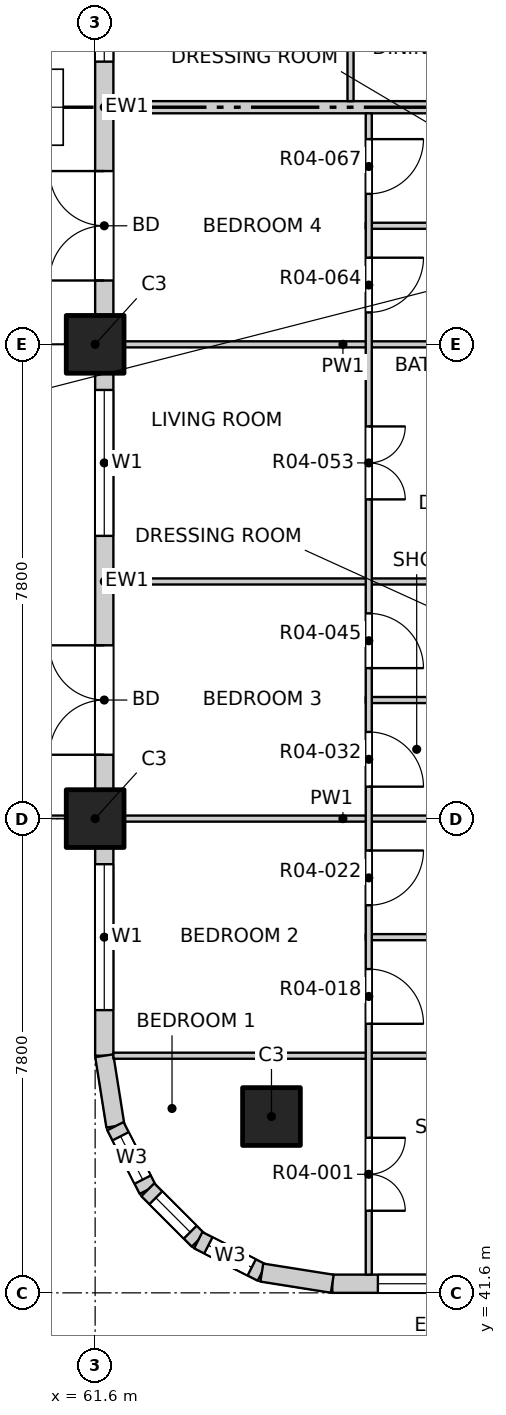
"""IFC4 building model, lengths in metres.
Left out: names, types, materials, properties, quantities, classifications, styles, units other than length and angle.
Written with IfcOpenShell. Run it as: python <this file> out.ifc"""

import sys

from ifc_helpers import new_model, si_unit, direction, frame, frame_2d, origin, origin_2d, place, context, subcontext, project, spatial, rectangle, extrude, element, fill, save


model = new_model("IFC4")
c1 = context("Model", 3, precision=1e-05, world=origin(), true_north=direction((0.0, 1.0)))
c2 = subcontext(c1, "Body", "Model", "MODEL_VIEW")
j1 = project(units=[si_unit("LENGTHUNIT", "METRE"), si_unit("PLANEANGLEUNIT", "RADIAN")], contexts=[c1])
p1 = place(None, origin())
s1 = spatial("IfcSite", under=j1, at=p1, CompositionType="ELEMENT")
p2 = place(p1, origin())
s2 = spatial("IfcBuilding", under=s1, at=p2, CompositionType="ELEMENT")
p3 = place(p2, frame((0.0, 0.0, 58.0)))
s3 = spatial("IfcBuildingStorey", under=s2, at=p3, CompositionType="ELEMENT", Elevation=58.0)
for number, where, z_axis, x_axis in (
    (1, (64.5, 44.5, -0.25), (0.0, 0.0, 1.0), (1.0, 0.0, 0.0)),
    (2, (61.6, 49.4, -0.25), (0.0, 0.0, 1.0), (1.0, 0.0, 0.0)),
    (3, (61.6, 57.2, -0.25), (0.0, 0.0, 1.0), (1.0, 0.0, 0.0)),
):
    element("IfcColumn", number, at=place(p3, frame(where, z_axis=z_axis, x_axis=x_axis)), inside=s3, PredefinedType="COLUMN", context=c2, shape_type="SweptSolid", body=[
        extrude(rectangle(XDim=0.95, YDim=0.95, at=origin_2d()), origin(), (0.0, 0.0, 1.0), 3.4),
    ])
p4 = place(p3, frame((65.5, 41.75, 0.0), z_axis=(0.0, 0.0, 1.0), x_axis=(1.0, 0.0, 0.0)))
e4 = element("IfcWall", 4, at=p4, inside=s3, PredefinedType="SOLIDWALL", context=c2, shape_type="SweptSolid", body=[
    extrude(rectangle(XDim=3.425, YDim=0.3, at=frame_2d((1.712, 0.0))), origin(), (0.0, 0.0, 1.0), 2.7),
])
p5 = place(p4, frame((0.75, 0.0, 0.9)))
e5 = element("IfcOpeningElement", 5, at=p5, cuts=e4, PredefinedType="OPENING", context=c2, shape_type="SweptSolid", body=[
    extrude(rectangle(XDim=2.4, YDim=1.8, at=frame_2d((1.2, 0.9))), frame((0.0, 0.16, 0.0), z_axis=(0.0, -1.0, 0.0), x_axis=(1.0, 0.0, 0.0)), (0.0, 0.0, 1.0), 0.32),
])
p6 = place(p3, frame((61.75, 45.5, 0.0), z_axis=(0.0, 0.0, 1.0), x_axis=(0.0, 1.0, 0.0)))
e6 = element("IfcWall", 6, at=p6, inside=s3, PredefinedType="SOLIDWALL", context=c2, shape_type="SweptSolid", body=[
    extrude(rectangle(XDim=3.425, YDim=0.3, at=frame_2d((1.712, 0.0))), origin(), (0.0, 0.0, 1.0), 2.7),
])
p7 = place(p6, frame((0.75, 0.0, 0.9)))
e7 = element("IfcOpeningElement", 7, at=p7, cuts=e6, PredefinedType="OPENING", context=c2, shape_type="SweptSolid", body=[
    extrude(rectangle(XDim=2.4, YDim=1.8, at=frame_2d((1.2, 0.9))), frame((0.0, 0.16, 0.0), z_axis=(0.0, -1.0, 0.0), x_axis=(1.0, 0.0, 0.0)), (0.0, 0.0, 1.0), 0.32),
])
p8 = place(p3, frame((61.75, 49.875, 0.0), z_axis=(0.0, 0.0, 1.0), x_axis=(0.0, 1.0, 0.0)))
e8 = element("IfcWall", 8, at=p8, inside=s3, PredefinedType="SOLIDWALL", context=c2, shape_type="SweptSolid", body=[
    extrude(rectangle(XDim=6.85, YDim=0.3, at=frame_2d((3.425, 0.0))), origin(), (0.0, 0.0, 1.0), 2.7),
])
p9 = place(p8, frame((0.575, 0.0, 0.0)))
e9 = element("IfcOpeningElement", 9, at=p9, cuts=e8, PredefinedType="OPENING", context=c2, shape_type="SweptSolid", body=[
    extrude(rectangle(XDim=1.8, YDim=2.4, at=frame_2d((0.9, 1.2))), frame((0.0, 0.16, 0.0), z_axis=(0.0, -1.0, 0.0), x_axis=(1.0, 0.0, 0.0)), (0.0, 0.0, 1.0), 0.32),
])
p10 = place(p8, frame((4.175, 0.0, 0.9)))
e10 = element("IfcOpeningElement", 10, at=p10, cuts=e8, PredefinedType="OPENING", context=c2, shape_type="SweptSolid", body=[
    extrude(rectangle(XDim=2.4, YDim=1.8, at=frame_2d((1.2, 0.9))), frame((0.0, 0.16, 0.0), z_axis=(0.0, -1.0, 0.0), x_axis=(1.0, 0.0, 0.0)), (0.0, 0.0, 1.0), 0.32),
])
p11 = place(p3, frame((61.75, 57.675, 0.0), z_axis=(0.0, 0.0, 1.0), x_axis=(0.0, 1.0, 0.0)))
e11 = element("IfcWall", 11, at=p11, inside=s3, PredefinedType="SOLIDWALL", context=c2, shape_type="SweptSolid", body=[
    extrude(rectangle(XDim=6.85, YDim=0.3, at=frame_2d((3.425, 0.0))), origin(), (0.0, 0.0, 1.0), 2.7),
])
p12 = place(p11, frame((0.575, 0.0, 0.0)))
e12 = element("IfcOpeningElement", 12, at=p12, cuts=e11, PredefinedType="OPENING", context=c2, shape_type="SweptSolid", body=[
    extrude(rectangle(XDim=1.8, YDim=2.4, at=frame_2d((0.9, 1.2))), frame((0.0, 0.16, 0.0), z_axis=(0.0, -1.0, 0.0), x_axis=(1.0, 0.0, 0.0)), (0.0, 0.0, 1.0), 0.32),
])
p13 = place(p11, frame((4.175, 0.0, 0.9)))
e13 = element("IfcOpeningElement", 13, at=p13, cuts=e11, PredefinedType="OPENING", context=c2, shape_type="SweptSolid", body=[
    extrude(rectangle(XDim=2.4, YDim=1.8, at=frame_2d((1.2, 0.9))), frame((0.0, 0.16, 0.0), z_axis=(0.0, -1.0, 0.0), x_axis=(1.0, 0.0, 0.0)), (0.0, 0.0, 1.0), 0.32),
])
p14 = place(p3, frame((61.75, 45.5, 0.0), z_axis=(0.0, 0.0, 1.0), x_axis=(0.156496880861, -0.987678452879, 0.0)))
e14 = element("IfcWall", 14, at=p14, inside=s3, PredefinedType="SOLIDWALL", context=c2, shape_type="SweptSolid", body=[
    extrude(rectangle(XDim=1.173, YDim=0.3, at=frame_2d((0.586, 0.0))), origin(), (0.0, 0.0, 1.0), 2.7),
])
p15 = place(p3, frame((61.934, 44.341, 0.0), z_axis=(0.0, 0.0, 1.0), x_axis=(0.454025524128, -0.890988677504, 0.0)))
e15 = element("IfcWall", 15, at=p15, inside=s3, PredefinedType="SOLIDWALL", context=c2, shape_type="SweptSolid", body=[
    extrude(rectangle(XDim=1.173, YDim=0.3, at=frame_2d((0.587, 0.0))), origin(), (0.0, 0.0, 1.0), 2.7),
])
p16 = place(p15, frame((0.187, 0.0, 0.9)))
e16 = element("IfcOpeningElement", 16, at=p16, cuts=e15, PredefinedType="OPENING", context=c2, shape_type="SweptSolid", body=[
    extrude(rectangle(XDim=0.8, YDim=1.2, at=frame_2d((0.4, 0.6))), frame((0.0, 0.16, 0.0), z_axis=(0.0, -1.0, 0.0), x_axis=(1.0, 0.0, 0.0)), (0.0, 0.0, 1.0), 0.32),
])
p17 = place(p3, frame((62.466, 43.296, 0.0), z_axis=(0.0, 0.0, 1.0), x_axis=(0.707106781187, -0.707106781187, 0.0)))
e17 = element("IfcWall", 17, at=p17, inside=s3, PredefinedType="SOLIDWALL", context=c2, shape_type="SweptSolid", body=[
    extrude(rectangle(XDim=1.173, YDim=0.3, at=frame_2d((0.586, 0.0))), origin(), (0.0, 0.0, 1.0), 2.7),
])
p18 = place(p17, frame((0.187, 0.0, 0.9)))
e18 = element("IfcOpeningElement", 18, at=p18, cuts=e17, PredefinedType="OPENING", context=c2, shape_type="SweptSolid", body=[
    extrude(rectangle(XDim=0.8, YDim=1.2, at=frame_2d((0.4, 0.6))), frame((0.0, 0.16, 0.0), z_axis=(0.0, -1.0, 0.0), x_axis=(1.0, 0.0, 0.0)), (0.0, 0.0, 1.0), 0.32),
])
p19 = place(p3, frame((63.296, 42.466, 0.0), z_axis=(0.0, 0.0, 1.0), x_axis=(0.890988677504, -0.454025524128, 0.0)))
e19 = element("IfcWall", 19, at=p19, inside=s3, PredefinedType="SOLIDWALL", context=c2, shape_type="SweptSolid", body=[
    extrude(rectangle(XDim=1.173, YDim=0.3, at=frame_2d((0.587, 0.0))), origin(), (0.0, 0.0, 1.0), 2.7),
])
p20 = place(p19, frame((0.187, 0.0, 0.9)))
e20 = element("IfcOpeningElement", 20, at=p20, cuts=e19, PredefinedType="OPENING", context=c2, shape_type="SweptSolid", body=[
    extrude(rectangle(XDim=0.8, YDim=1.2, at=frame_2d((0.4, 0.6))), frame((0.0, 0.16, 0.0), z_axis=(0.0, -1.0, 0.0), x_axis=(1.0, 0.0, 0.0)), (0.0, 0.0, 1.0), 0.32),
])
p21 = place(p3, frame((64.341, 41.934, 0.0), z_axis=(0.0, 0.0, 1.0), x_axis=(0.987678452879, -0.156496880861, 0.0)))
e21 = element("IfcWall", 21, at=p21, inside=s3, PredefinedType="SOLIDWALL", context=c2, shape_type="SweptSolid", body=[
    extrude(rectangle(XDim=1.173, YDim=0.3, at=frame_2d((0.586, 0.0))), origin(), (0.0, 0.0, 1.0), 2.7),
])
p22 = place(p3, frame((61.9, 45.5, 0.0), z_axis=(0.0, 0.0, 1.0), x_axis=(1.0, 0.0, 0.0)))
e22 = element("IfcWall", 22, at=p22, inside=s3, PredefinedType="PARTITIONING", context=c2, shape_type="SweptSolid", body=[
    extrude(rectangle(XDim=11.5, YDim=0.1, at=frame_2d((5.75, 0.0))), origin(), (0.0, 0.0, 1.0), 3.15),
])
p23 = place(p22, frame((7.965, 0.0, 0.0)))
e23 = element("IfcOpeningElement", 23, at=p23, cuts=e22, PredefinedType="OPENING", context=c2, shape_type="SweptSolid", body=[
    extrude(rectangle(XDim=0.9, YDim=2.1, at=frame_2d((0.45, 1.05))), frame((0.0, 0.06, 0.0), z_axis=(0.0, -1.0, 0.0), x_axis=(1.0, 0.0, 0.0)), (0.0, 0.0, 1.0), 0.12),
])
p24 = place(p3, frame((66.05, 47.45, 0.0), z_axis=(0.0, 0.0, 1.0), x_axis=(1.0, 0.0, 0.0)))
e24 = element("IfcWall", 24, at=p24, inside=s3, PredefinedType="PARTITIONING", context=c2, shape_type="SweptSolid", body=[
    extrude(rectangle(XDim=3.4, YDim=0.1, at=frame_2d((1.7, 0.0))), origin(), (0.0, 0.0, 1.0), 3.15),
])
p25 = place(p3, frame((61.9, 49.4, 0.0), z_axis=(0.0, 0.0, 1.0), x_axis=(1.0, 0.0, 0.0)))
e25 = element("IfcWall", 25, at=p25, inside=s3, PredefinedType="PARTITIONING", context=c2, shape_type="SweptSolid", body=[
    extrude(rectangle(XDim=7.55, YDim=0.1, at=frame_2d((3.775, 0.0))), origin(), (0.0, 0.0, 1.0), 2.55),
])
p26 = place(p3, frame((66.05, 51.35, 0.0), z_axis=(0.0, 0.0, 1.0), x_axis=(1.0, 0.0, 0.0)))
e26 = element("IfcWall", 26, at=p26, inside=s3, PredefinedType="PARTITIONING", context=c2, shape_type="SweptSolid", body=[
    extrude(rectangle(XDim=3.4, YDim=0.1, at=frame_2d((1.7, 0.0))), origin(), (0.0, 0.0, 1.0), 3.15),
])
p27 = place(p3, frame((61.9, 53.3, 0.0), z_axis=(0.0, 0.0, 1.0), x_axis=(1.0, 0.0, 0.0)))
e27 = element("IfcWall", 27, at=p27, inside=s3, PredefinedType="PARTITIONING", context=c2, shape_type="SweptSolid", body=[
    extrude(rectangle(XDim=7.55, YDim=0.1, at=frame_2d((3.775, 0.0))), origin(), (0.0, 0.0, 1.0), 3.15),
])
p28 = place(p3, frame((61.9, 57.2, 0.0), z_axis=(0.0, 0.0, 1.0), x_axis=(1.0, 0.0, 0.0)))
e28 = element("IfcWall", 28, at=p28, inside=s3, PredefinedType="PARTITIONING", context=c2, shape_type="SweptSolid", body=[
    extrude(rectangle(XDim=7.55, YDim=0.1, at=frame_2d((3.775, 0.0))), origin(), (0.0, 0.0, 1.0), 2.55),
])
p29 = place(p3, frame((66.05, 59.15, 0.0), z_axis=(0.0, 0.0, 1.0), x_axis=(1.0, 0.0, 0.0)))
e29 = element("IfcWall", 29, at=p29, inside=s3, PredefinedType="PARTITIONING", context=c2, shape_type="SweptSolid", body=[
    extrude(rectangle(XDim=3.4, YDim=0.1, at=frame_2d((1.7, 0.0))), origin(), (0.0, 0.0, 1.0), 3.15),
])
p30 = place(p3, frame((61.9, 61.1, 0.0), z_axis=(0.0, 0.0, 1.0), x_axis=(1.0, 0.0, 0.0)))
e30 = element("IfcWall", 30, at=p30, inside=s3, PredefinedType="PARTITIONING", context=c2, shape_type="SweptSolid", body=[
    extrude(rectangle(XDim=11.5, YDim=0.2, at=frame_2d((5.75, 0.0))), origin(), (0.0, 0.0, 1.0), 3.15),
])
p31 = place(p3, frame((65.8, 61.2, 0.0), z_axis=(0.0, 0.0, 1.0), x_axis=(0.0, 1.0, 0.0)))
e31 = element("IfcWall", 31, at=p31, inside=s3, PredefinedType="PARTITIONING", context=c2, shape_type="SweptSolid", body=[
    extrude(rectangle(XDim=15.4, YDim=0.1, at=frame_2d((7.7, 0.0))), origin(), (0.0, 0.0, 1.0), 3.15),
])
p32 = place(p31, frame((1.25, 0.0, 0.0)))
e32 = element("IfcOpeningElement", 32, at=p32, cuts=e31, PredefinedType="OPENING", context=c2, shape_type="SweptSolid", body=[
    extrude(rectangle(XDim=1.2, YDim=2.1, at=frame_2d((0.6, 1.05))), frame((0.0, 0.06, 0.0), z_axis=(0.0, -1.0, 0.0), x_axis=(1.0, 0.0, 0.0)), (0.0, 0.0, 1.0), 0.12),
])
p33 = place(p31, frame((4.325, 0.0, 0.0)))
e33 = element("IfcOpeningElement", 33, at=p33, cuts=e31, PredefinedType="OPENING", context=c2, shape_type="SweptSolid", body=[
    extrude(rectangle(XDim=0.9, YDim=2.1, at=frame_2d((0.45, 1.05))), frame((0.0, 0.06, 0.0), z_axis=(0.0, -1.0, 0.0), x_axis=(1.0, 0.0, 0.0)), (0.0, 0.0, 1.0), 0.12),
])
p34 = place(p31, frame((6.275, 0.0, 0.0)))
e34 = element("IfcOpeningElement", 34, at=p34, cuts=e31, PredefinedType="OPENING", context=c2, shape_type="SweptSolid", body=[
    extrude(rectangle(XDim=0.9, YDim=2.1, at=frame_2d((0.45, 1.05))), frame((0.0, 0.06, 0.0), z_axis=(0.0, -1.0, 0.0), x_axis=(1.0, 0.0, 0.0)), (0.0, 0.0, 1.0), 0.12),
])
p35 = place(p31, frame((8.225, 0.0, 0.0)))
e35 = element("IfcOpeningElement", 35, at=p35, cuts=e31, PredefinedType="OPENING", context=c2, shape_type="SweptSolid", body=[
    extrude(rectangle(XDim=0.9, YDim=2.1, at=frame_2d((0.45, 1.05))), frame((0.0, 0.06, 0.0), z_axis=(0.0, -1.0, 0.0), x_axis=(1.0, 0.0, 0.0)), (0.0, 0.0, 1.0), 0.12),
])
p36 = place(p31, frame((10.175, 0.0, 0.0)))
e36 = element("IfcOpeningElement", 36, at=p36, cuts=e31, PredefinedType="OPENING", context=c2, shape_type="SweptSolid", body=[
    extrude(rectangle(XDim=0.9, YDim=2.1, at=frame_2d((0.45, 1.05))), frame((0.0, 0.06, 0.0), z_axis=(0.0, -1.0, 0.0), x_axis=(1.0, 0.0, 0.0)), (0.0, 0.0, 1.0), 0.12),
])
p37 = place(p31, frame((12.125, 0.0, 0.0)))
e37 = element("IfcOpeningElement", 37, at=p37, cuts=e31, PredefinedType="OPENING", context=c2, shape_type="SweptSolid", body=[
    extrude(rectangle(XDim=0.9, YDim=2.1, at=frame_2d((0.45, 1.05))), frame((0.0, 0.06, 0.0), z_axis=(0.0, -1.0, 0.0), x_axis=(1.0, 0.0, 0.0)), (0.0, 0.0, 1.0), 0.12),
])
p38 = place(p31, frame((14.075, 0.0, 0.0)))
e38 = element("IfcOpeningElement", 38, at=p38, cuts=e31, PredefinedType="OPENING", context=c2, shape_type="SweptSolid", body=[
    extrude(rectangle(XDim=0.9, YDim=2.1, at=frame_2d((0.45, 1.05))), frame((0.0, 0.06, 0.0), z_axis=(0.0, -1.0, 0.0), x_axis=(1.0, 0.0, 0.0)), (0.0, 0.0, 1.0), 0.12),
])
p39 = place(p3, frame((66.1, 41.9, 0.0), z_axis=(0.0, 0.0, 1.0), x_axis=(0.0, 1.0, 0.0)))
e39 = element("IfcWall", 39, at=p39, inside=s3, PredefinedType="PARTITIONING", context=c2, shape_type="SweptSolid", body=[
    extrude(rectangle(XDim=19.1, YDim=0.1, at=frame_2d((9.55, 0.0))), origin(), (0.0, 0.0, 1.0), 3.15),
])
p40 = place(p39, frame((1.05, 0.0, 0.0)))
e40 = element("IfcOpeningElement", 40, at=p40, cuts=e39, PredefinedType="OPENING", context=c2, shape_type="SweptSolid", body=[
    extrude(rectangle(XDim=1.2, YDim=2.1, at=frame_2d((0.6, 1.05))), frame((0.0, 0.06, 0.0), z_axis=(0.0, -1.0, 0.0), x_axis=(1.0, 0.0, 0.0)), (0.0, 0.0, 1.0), 0.12),
])
p41 = place(p39, frame((4.125, 0.0, 0.0)))
e41 = element("IfcOpeningElement", 41, at=p41, cuts=e39, PredefinedType="OPENING", context=c2, shape_type="SweptSolid", body=[
    extrude(rectangle(XDim=0.9, YDim=2.1, at=frame_2d((0.45, 1.05))), frame((0.0, 0.06, 0.0), z_axis=(0.0, -1.0, 0.0), x_axis=(1.0, 0.0, 0.0)), (0.0, 0.0, 1.0), 0.12),
])
p42 = place(p39, frame((6.075, 0.0, 0.0)))
e42 = element("IfcOpeningElement", 42, at=p42, cuts=e39, PredefinedType="OPENING", context=c2, shape_type="SweptSolid", body=[
    extrude(rectangle(XDim=0.9, YDim=2.1, at=frame_2d((0.45, 1.05))), frame((0.0, 0.06, 0.0), z_axis=(0.0, -1.0, 0.0), x_axis=(1.0, 0.0, 0.0)), (0.0, 0.0, 1.0), 0.12),
])
p43 = place(p39, frame((8.025, 0.0, 0.0)))
e43 = element("IfcOpeningElement", 43, at=p43, cuts=e39, PredefinedType="OPENING", context=c2, shape_type="SweptSolid", body=[
    extrude(rectangle(XDim=0.9, YDim=2.1, at=frame_2d((0.45, 1.05))), frame((0.0, 0.06, 0.0), z_axis=(0.0, -1.0, 0.0), x_axis=(1.0, 0.0, 0.0)), (0.0, 0.0, 1.0), 0.12),
])
p44 = place(p39, frame((9.975, 0.0, 0.0)))
e44 = element("IfcOpeningElement", 44, at=p44, cuts=e39, PredefinedType="OPENING", context=c2, shape_type="SweptSolid", body=[
    extrude(rectangle(XDim=0.9, YDim=2.1, at=frame_2d((0.45, 1.05))), frame((0.0, 0.06, 0.0), z_axis=(0.0, -1.0, 0.0), x_axis=(1.0, 0.0, 0.0)), (0.0, 0.0, 1.0), 0.12),
])
p45 = place(p39, frame((12.75, 0.0, 0.0)))
e45 = element("IfcOpeningElement", 45, at=p45, cuts=e39, PredefinedType="OPENING", context=c2, shape_type="SweptSolid", body=[
    extrude(rectangle(XDim=1.2, YDim=2.1, at=frame_2d((0.6, 1.05))), frame((0.0, 0.06, 0.0), z_axis=(0.0, -1.0, 0.0), x_axis=(1.0, 0.0, 0.0)), (0.0, 0.0, 1.0), 0.12),
])
p46 = place(p39, frame((15.825, 0.0, 0.0)))
e46 = element("IfcOpeningElement", 46, at=p46, cuts=e39, PredefinedType="OPENING", context=c2, shape_type="SweptSolid", body=[
    extrude(rectangle(XDim=0.9, YDim=2.1, at=frame_2d((0.45, 1.05))), frame((0.0, 0.06, 0.0), z_axis=(0.0, -1.0, 0.0), x_axis=(1.0, 0.0, 0.0)), (0.0, 0.0, 1.0), 0.12),
])
p47 = place(p39, frame((17.775, 0.0, 0.0)))
e47 = element("IfcOpeningElement", 47, at=p47, cuts=e39, PredefinedType="OPENING", context=c2, shape_type="SweptSolid", body=[
    extrude(rectangle(XDim=0.9, YDim=2.1, at=frame_2d((0.45, 1.05))), frame((0.0, 0.06, 0.0), z_axis=(0.0, -1.0, 0.0), x_axis=(1.0, 0.0, 0.0)), (0.0, 0.0, 1.0), 0.12),
])
p48 = place(p5, origin())
e48 = element("IfcWindow", 48, at=p48, inside=s3, PartitioningType="DOUBLE_PANEL_VERTICAL", PredefinedType="WINDOW", context=c2, shape_type="SweptSolid", body=[
    extrude(rectangle(XDim=2.4, YDim=1.8, at=frame_2d((1.2, 0.9))), frame((0.0, 0.03, 0.0), z_axis=(0.0, -1.0, 0.0), x_axis=(1.0, 0.0, 0.0)), (0.0, 0.0, 1.0), 0.06),
])
fill(e5, e48)
p49 = place(p7, origin())
e49 = element("IfcWindow", 49, at=p49, inside=s3, PartitioningType="DOUBLE_PANEL_VERTICAL", PredefinedType="WINDOW", context=c2, shape_type="SweptSolid", body=[
    extrude(rectangle(XDim=2.4, YDim=1.8, at=frame_2d((1.2, 0.9))), frame((0.0, 0.03, 0.0), z_axis=(0.0, -1.0, 0.0), x_axis=(1.0, 0.0, 0.0)), (0.0, 0.0, 1.0), 0.06),
])
fill(e7, e49)
p50 = place(p9, origin())
e50 = element("IfcDoor", 50, at=p50, inside=s3, OperationType="DOUBLE_DOOR_SINGLE_SWING", PredefinedType="DOOR", context=c2, shape_type="SweptSolid", body=[
    extrude(rectangle(XDim=1.8, YDim=2.4, at=frame_2d((0.9, 1.2))), frame((0.0, 0.025, 0.0), z_axis=(0.0, -1.0, 0.0), x_axis=(1.0, 0.0, 0.0)), (0.0, 0.0, 1.0), 0.05),
])
fill(e9, e50)
p51 = place(p10, origin())
e51 = element("IfcWindow", 51, at=p51, inside=s3, PartitioningType="DOUBLE_PANEL_VERTICAL", PredefinedType="WINDOW", context=c2, shape_type="SweptSolid", body=[
    extrude(rectangle(XDim=2.4, YDim=1.8, at=frame_2d((1.2, 0.9))), frame((0.0, 0.03, 0.0), z_axis=(0.0, -1.0, 0.0), x_axis=(1.0, 0.0, 0.0)), (0.0, 0.0, 1.0), 0.06),
])
fill(e10, e51)
p52 = place(p12, origin())
e52 = element("IfcDoor", 52, at=p52, inside=s3, OperationType="DOUBLE_DOOR_SINGLE_SWING", PredefinedType="DOOR", context=c2, shape_type="SweptSolid", body=[
    extrude(rectangle(XDim=1.8, YDim=2.4, at=frame_2d((0.9, 1.2))), frame((0.0, 0.025, 0.0), z_axis=(0.0, -1.0, 0.0), x_axis=(1.0, 0.0, 0.0)), (0.0, 0.0, 1.0), 0.05),
])
fill(e12, e52)
p53 = place(p13, origin())
e53 = element("IfcWindow", 53, at=p53, inside=s3, PartitioningType="DOUBLE_PANEL_VERTICAL", PredefinedType="WINDOW", context=c2, shape_type="SweptSolid", body=[
    extrude(rectangle(XDim=2.4, YDim=1.8, at=frame_2d((1.2, 0.9))), frame((0.0, 0.03, 0.0), z_axis=(0.0, -1.0, 0.0), x_axis=(1.0, 0.0, 0.0)), (0.0, 0.0, 1.0), 0.06),
])
fill(e13, e53)
p54 = place(p16, origin())
e54 = element("IfcWindow", 54, at=p54, inside=s3, PartitioningType="SINGLE_PANEL", PredefinedType="WINDOW", context=c2, shape_type="SweptSolid", body=[
    extrude(rectangle(XDim=0.8, YDim=1.2, at=frame_2d((0.4, 0.6))), frame((0.0, 0.03, 0.0), z_axis=(0.0, -1.0, 0.0), x_axis=(1.0, 0.0, 0.0)), (0.0, 0.0, 1.0), 0.06),
])
fill(e16, e54)
p55 = place(p18, origin())
e55 = element("IfcWindow", 55, at=p55, inside=s3, PartitioningType="SINGLE_PANEL", PredefinedType="WINDOW", context=c2, shape_type="SweptSolid", body=[
    extrude(rectangle(XDim=0.8, YDim=1.2, at=frame_2d((0.4, 0.6))), frame((0.0, 0.03, 0.0), z_axis=(0.0, -1.0, 0.0), x_axis=(1.0, 0.0, 0.0)), (0.0, 0.0, 1.0), 0.06),
])
fill(e18, e55)
p56 = place(p20, origin())
e56 = element("IfcWindow", 56, at=p56, inside=s3, PartitioningType="SINGLE_PANEL", PredefinedType="WINDOW", context=c2, shape_type="SweptSolid", body=[
    extrude(rectangle(XDim=0.8, YDim=1.2, at=frame_2d((0.4, 0.6))), frame((0.0, 0.03, 0.0), z_axis=(0.0, -1.0, 0.0), x_axis=(1.0, 0.0, 0.0)), (0.0, 0.0, 1.0), 0.06),
])
fill(e20, e56)
p57 = place(p40, origin())
e57 = element("IfcDoor", 57, at=p57, inside=s3, OperationType="DOUBLE_DOOR_SINGLE_SWING", PredefinedType="DOOR", context=c2, shape_type="SweptSolid", body=[
    extrude(rectangle(XDim=1.2, YDim=2.1, at=frame_2d((0.6, 1.05))), frame((0.0, 0.025, 0.0), z_axis=(0.0, -1.0, 0.0), x_axis=(1.0, 0.0, 0.0)), (0.0, 0.0, 1.0), 0.05),
])
fill(e40, e57)
p58 = place(p41, origin())
e58 = element("IfcDoor", 58, at=p58, inside=s3, OperationType="SINGLE_SWING_RIGHT", PredefinedType="DOOR", context=c2, shape_type="SweptSolid", body=[
    extrude(rectangle(XDim=0.9, YDim=2.1, at=frame_2d((0.45, 1.05))), frame((0.0, 0.025, 0.0), z_axis=(0.0, -1.0, 0.0), x_axis=(1.0, 0.0, 0.0)), (0.0, 0.0, 1.0), 0.05),
])
fill(e41, e58)
p59 = place(p42, origin())
e59 = element("IfcDoor", 59, at=p59, inside=s3, OperationType="SINGLE_SWING_LEFT", PredefinedType="DOOR", context=c2, shape_type="SweptSolid", body=[
    extrude(rectangle(XDim=0.9, YDim=2.1, at=frame_2d((0.45, 1.05))), frame((0.0, 0.025, 0.0), z_axis=(0.0, -1.0, 0.0), x_axis=(1.0, 0.0, 0.0)), (0.0, 0.0, 1.0), 0.05),
])
fill(e42, e59)
p60 = place(p43, origin())
e60 = element("IfcDoor", 60, at=p60, inside=s3, OperationType="SINGLE_SWING_RIGHT", PredefinedType="DOOR", context=c2, shape_type="SweptSolid", body=[
    extrude(rectangle(XDim=0.9, YDim=2.1, at=frame_2d((0.45, 1.05))), frame((0.0, 0.025, 0.0), z_axis=(0.0, -1.0, 0.0), x_axis=(1.0, 0.0, 0.0)), (0.0, 0.0, 1.0), 0.05),
])
fill(e43, e60)
p61 = place(p44, origin())
e61 = element("IfcDoor", 61, at=p61, inside=s3, OperationType="SINGLE_SWING_RIGHT", PredefinedType="DOOR", context=c2, shape_type="SweptSolid", body=[
    extrude(rectangle(XDim=0.9, YDim=2.1, at=frame_2d((0.45, 1.05))), frame((0.0, 0.025, 0.0), z_axis=(0.0, -1.0, 0.0), x_axis=(1.0, 0.0, 0.0)), (0.0, 0.0, 1.0), 0.05),
])
fill(e44, e61)
p62 = place(p45, origin())
e62 = element("IfcDoor", 62, at=p62, inside=s3, OperationType="DOUBLE_DOOR_SINGLE_SWING", PredefinedType="DOOR", context=c2, shape_type="SweptSolid", body=[
    extrude(rectangle(XDim=1.2, YDim=2.1, at=frame_2d((0.6, 1.05))), frame((0.0, 0.025, 0.0), z_axis=(0.0, -1.0, 0.0), x_axis=(1.0, 0.0, 0.0)), (0.0, 0.0, 1.0), 0.05),
])
fill(e45, e62)
p63 = place(p46, origin())
e63 = element("IfcDoor", 63, at=p63, inside=s3, OperationType="SINGLE_SWING_LEFT", PredefinedType="DOOR", context=c2, shape_type="SweptSolid", body=[
    extrude(rectangle(XDim=0.9, YDim=2.1, at=frame_2d((0.45, 1.05))), frame((0.0, 0.025, 0.0), z_axis=(0.0, -1.0, 0.0), x_axis=(1.0, 0.0, 0.0)), (0.0, 0.0, 1.0), 0.05),
])
fill(e46, e63)
p64 = place(p47, origin())
e64 = element("IfcDoor", 64, at=p64, inside=s3, OperationType="SINGLE_SWING_LEFT", PredefinedType="DOOR", context=c2, shape_type="SweptSolid", body=[
    extrude(rectangle(XDim=0.9, YDim=2.1, at=frame_2d((0.45, 1.05))), frame((0.0, 0.025, 0.0), z_axis=(0.0, -1.0, 0.0), x_axis=(1.0, 0.0, 0.0)), (0.0, 0.0, 1.0), 0.05),
])
fill(e47, e64)
save(model, sys.argv[1])
